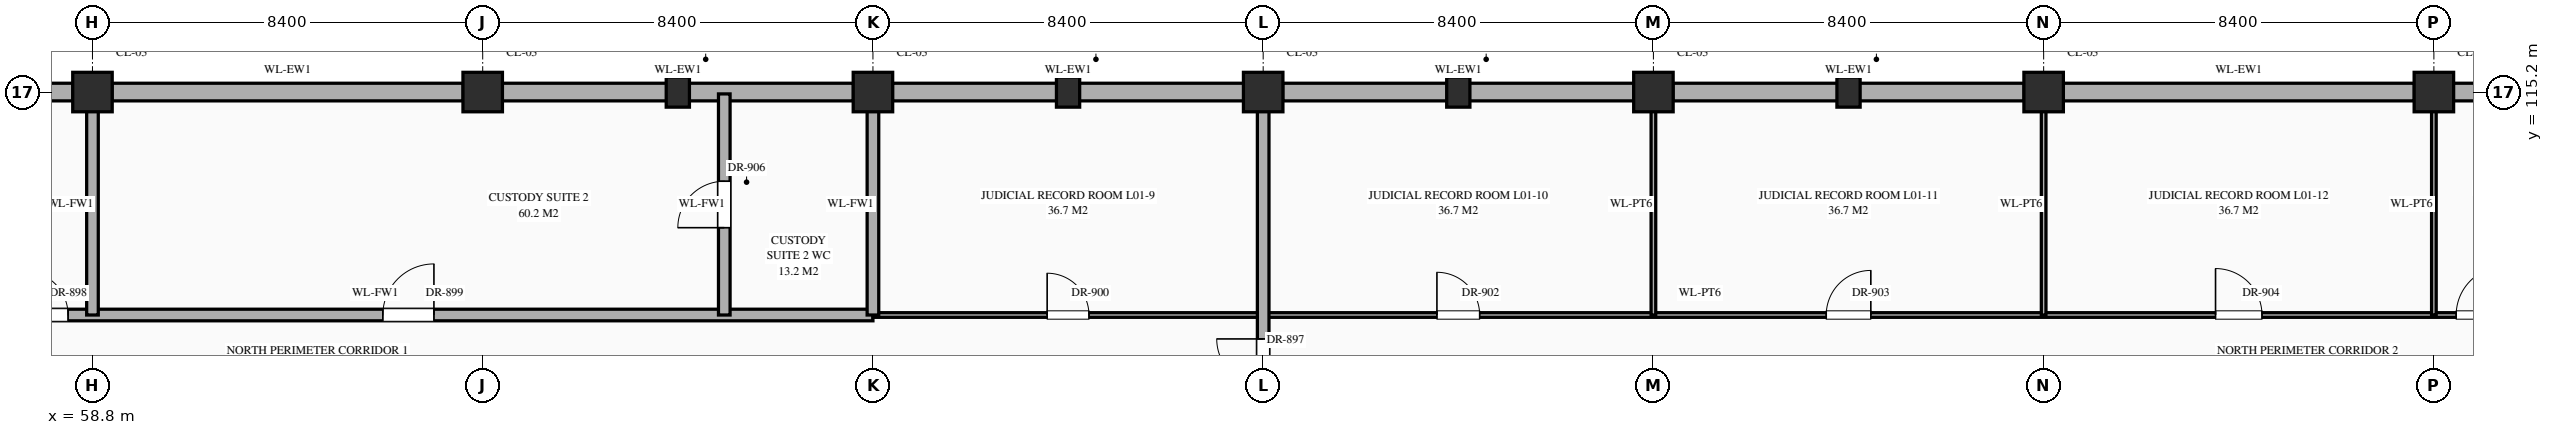
"""IFC4 building model, lengths in metres.
Left out: names, types, materials, properties, quantities, classifications, styles, units other than length and angle.
Written with IfcOpenShell. Run it as: python <this file> out.ifc"""

import sys

from ifc_helpers import new_model, si_unit, direction, frame, frame_2d, origin, origin_2d, place, context, subcontext, project, spatial, rectangle, extrude, element, fill, save


model = new_model("IFC4")
c1 = context("Model", 3, precision=1e-05, world=origin(), true_north=direction((0.0, 1.0)))
c2 = subcontext(c1, "Body", "Model", "MODEL_VIEW")
j1 = project(units=[si_unit("LENGTHUNIT", "METRE"), si_unit("PLANEANGLEUNIT", "RADIAN")], contexts=[c1])
p1 = place(None, origin())
s1 = spatial("IfcSite", under=j1, at=p1, CompositionType="ELEMENT")
p2 = place(p1, origin())
s2 = spatial("IfcBuilding", under=s1, at=p2, CompositionType="ELEMENT")
p3 = place(p2, origin())
s3 = spatial("IfcBuildingStorey", under=s2, at=p3, CompositionType="ELEMENT", Elevation=0.0)
for number, where, z_axis, x_axis in (
    (1, (58.8, 115.2, 0.0), (0.0, 0.0, 1.0), (1.0, 0.0, 0.0)),
    (2, (67.2, 115.2, 0.0), (0.0, 0.0, 1.0), (1.0, 0.0, 0.0)),
    (3, (75.6, 115.2, 0.0), (0.0, 0.0, 1.0), (1.0, 0.0, 0.0)),
    (4, (84.0, 115.2, 0.0), (0.0, 0.0, 1.0), (1.0, 0.0, 0.0)),
    (5, (92.4, 115.2, 0.0), (0.0, 0.0, 1.0), (1.0, 0.0, 0.0)),
    (6, (100.8, 115.2, 0.0), (0.0, 0.0, 1.0), (1.0, 0.0, 0.0)),
    (7, (109.2, 115.2, 0.0), (0.0, 0.0, 1.0), (1.0, 0.0, 0.0)),
):
    element("IfcColumn", number, at=place(p3, frame(where, z_axis=z_axis, x_axis=x_axis)), inside=s3, PredefinedType="COLUMN", context=c2, shape_type="SweptSolid", body=[
        extrude(rectangle(XDim=0.85, YDim=0.85, at=origin_2d()), origin(), (0.0, 0.0, 1.0), 5.4),
    ])
for number, where, z_axis, x_axis in (
    (8, (71.4, 115.2, 0.0), (0.0, 0.0, 1.0), (1.0, 0.0, 0.0)),
    (9, (79.8, 115.2, 0.0), (0.0, 0.0, 1.0), (1.0, 0.0, 0.0)),
    (10, (88.2, 115.2, 0.0), (0.0, 0.0, 1.0), (1.0, 0.0, 0.0)),
    (11, (96.6, 115.2, 0.0), (0.0, 0.0, 1.0), (1.0, 0.0, 0.0)),
):
    element("IfcColumn", number, at=place(p3, frame(where, z_axis=z_axis, x_axis=x_axis)), inside=s3, PredefinedType="PILASTER", context=c2, shape_type="SweptSolid", body=[
        extrude(rectangle(XDim=0.5, YDim=0.65, at=origin_2d()), origin(), (0.0, 0.0, 1.0), 5.4),
    ])
p4 = place(p3, frame((50.82, 115.2, 0.0), z_axis=(0.0, 0.0, 1.0), x_axis=(1.0, 0.0, 0.0)))
e12 = element("IfcWall", 12, at=p4, inside=s3, PredefinedType="STANDARD", context=c2, shape_type="SweptSolid", body=[
    extrude(rectangle(XDim=7.56, YDim=0.38, at=frame_2d((3.78, 0.0))), origin(), (0.0, 0.0, 1.0), 4.47),
])
p5 = place(p3, frame((59.22, 115.2, 0.0), z_axis=(0.0, 0.0, 1.0), x_axis=(1.0, 0.0, 0.0)))
e13 = element("IfcWall", 13, at=p5, inside=s3, PredefinedType="STANDARD", context=c2, shape_type="SweptSolid", body=[
    extrude(rectangle(XDim=7.56, YDim=0.38, at=frame_2d((3.78, 0.0))), origin(), (0.0, 0.0, 1.0), 4.47),
])
p6 = place(p3, frame((67.62, 115.2, 0.0), z_axis=(0.0, 0.0, 1.0), x_axis=(1.0, 0.0, 0.0)))
e14 = element("IfcWall", 14, at=p6, inside=s3, PredefinedType="STANDARD", context=c2, shape_type="SweptSolid", body=[
    extrude(rectangle(XDim=7.56, YDim=0.38, at=frame_2d((3.78, 0.0))), origin(), (0.0, 0.0, 1.0), 4.47),
])
for number, where, z_axis, x_axis in (
    (15, (76.02, 115.2, 0.0), (0.0, 0.0, 1.0), (1.0, 0.0, 0.0)),
    (16, (84.42, 115.2, 0.0), (0.0, 0.0, 1.0), (1.0, 0.0, 0.0)),
):
    element("IfcWall", number, at=place(p3, frame(where, z_axis=z_axis, x_axis=x_axis)), inside=s3, PredefinedType="STANDARD", context=c2, shape_type="SweptSolid", body=[
        extrude(rectangle(XDim=7.56, YDim=0.38, at=frame_2d((3.78, 0.0))), origin(), (0.0, 0.0, 1.0), 4.47),
    ])
p7 = place(p3, frame((92.82, 115.2, 0.0), z_axis=(0.0, 0.0, 1.0), x_axis=(1.0, 0.0, 0.0)))
e17 = element("IfcWall", 17, at=p7, inside=s3, PredefinedType="STANDARD", context=c2, shape_type="SweptSolid", body=[
    extrude(rectangle(XDim=7.56, YDim=0.38, at=frame_2d((3.78, 0.0))), origin(), (0.0, 0.0, 1.0), 4.47),
])
p8 = place(p3, frame((101.22, 115.2, 0.0), z_axis=(0.0, 0.0, 1.0), x_axis=(1.0, 0.0, 0.0)))
e18 = element("IfcWall", 18, at=p8, inside=s3, PredefinedType="STANDARD", context=c2, shape_type="SweptSolid", body=[
    extrude(rectangle(XDim=7.56, YDim=0.38, at=frame_2d((3.78, 0.0))), origin(), (0.0, 0.0, 1.0), 4.47),
])
p9 = place(p3, frame((109.62, 115.2, 0.0), z_axis=(0.0, 0.0, 1.0), x_axis=(1.0, 0.0, 0.0)))
e19 = element("IfcWall", 19, at=p9, inside=s3, PredefinedType="STANDARD", context=c2, shape_type="SweptSolid", body=[
    extrude(rectangle(XDim=7.56, YDim=0.38, at=frame_2d((3.78, 0.0))), origin(), (0.0, 0.0, 1.0), 4.47),
])
p10 = place(p3, frame((50.44, 110.4, 0.0), z_axis=(0.0, 0.0, 1.0), x_axis=(1.0, 0.0, 0.0)))
e20 = element("IfcWall", 20, at=p10, inside=s3, PredefinedType="STANDARD", context=c2, shape_type="SweptSolid", body=[
    extrude(rectangle(XDim=25.16, YDim=0.25, at=frame_2d((12.58, 0.0))), origin(), (0.0, 0.0, 1.0), 5.12),
])
p11 = place(p10, frame((6.885, 0.0, 0.0)))
e21 = element("IfcOpeningElement", 21, at=p11, cuts=e20, PredefinedType="OPENING", context=c2, shape_type="SweptSolid", body=[
    extrude(rectangle(XDim=0.95, YDim=2.15, at=frame_2d((0.475, 1.075))), frame((0.0, 0.137, 0.0), z_axis=(0.0, -1.0, 0.0), x_axis=(1.0, 0.0, 0.0)), (0.0, 0.0, 1.0), 0.274),
])
p12 = place(p10, frame((14.61, 0.0, 0.0)))
e22 = element("IfcOpeningElement", 22, at=p12, cuts=e20, PredefinedType="OPENING", context=c2, shape_type="SweptSolid", body=[
    extrude(rectangle(XDim=1.1, YDim=2.2, at=frame_2d((0.55, 1.1))), frame((0.0, 0.137, 0.0), z_axis=(0.0, -1.0, 0.0), x_axis=(1.0, 0.0, 0.0)), (0.0, 0.0, 1.0), 0.274),
])
p13 = place(p3, frame((75.6, 110.4, 0.0), z_axis=(0.0, 0.0, 1.0), x_axis=(1.0, 0.0, 0.0)))
e23 = element("IfcWall", 23, at=p13, inside=s3, PredefinedType="STANDARD", context=c2, shape_type="SweptSolid", body=[
    extrude(rectangle(XDim=35.6, YDim=0.1, at=frame_2d((17.8, 0.0))), origin(), (0.0, 0.0, 1.0), 5.12),
])
p14 = place(p13, frame((3.75, 0.0, 0.0)))
e24 = element("IfcOpeningElement", 24, at=p14, cuts=e23, PredefinedType="OPENING", context=c2, shape_type="SweptSolid", body=[
    extrude(rectangle(XDim=0.9, YDim=2.15, at=frame_2d((0.45, 1.075))), frame((0.0, 0.062, 0.0), z_axis=(0.0, -1.0, 0.0), x_axis=(1.0, 0.0, 0.0)), (0.0, 0.0, 1.0), 0.124),
])
p15 = place(p13, frame((12.14, 0.0, 0.0)))
e25 = element("IfcOpeningElement", 25, at=p15, cuts=e23, PredefinedType="OPENING", context=c2, shape_type="SweptSolid", body=[
    extrude(rectangle(XDim=0.92, YDim=2.15, at=frame_2d((0.46, 1.075))), frame((0.0, 0.062, 0.0), z_axis=(0.0, -1.0, 0.0), x_axis=(1.0, 0.0, 0.0)), (0.0, 0.0, 1.0), 0.124),
])
p16 = place(p13, frame((20.52, 0.0, 0.0)))
e26 = element("IfcOpeningElement", 26, at=p16, cuts=e23, PredefinedType="OPENING", context=c2, shape_type="SweptSolid", body=[
    extrude(rectangle(XDim=0.96, YDim=2.2, at=frame_2d((0.48, 1.1))), frame((0.0, 0.062, 0.0), z_axis=(0.0, -1.0, 0.0), x_axis=(1.0, 0.0, 0.0)), (0.0, 0.0, 1.0), 0.124),
])
p17 = place(p13, frame((28.9, 0.0, 0.0)))
e27 = element("IfcOpeningElement", 27, at=p17, cuts=e23, PredefinedType="OPENING", context=c2, shape_type="SweptSolid", body=[
    extrude(rectangle(XDim=1.0, YDim=2.25, at=frame_2d((0.5, 1.125))), frame((0.0, 0.062, 0.0), z_axis=(0.0, -1.0, 0.0), x_axis=(1.0, 0.0, 0.0)), (0.0, 0.0, 1.0), 0.124),
])
p18 = place(p13, frame((34.08, 0.0, 0.0)))
e28 = element("IfcOpeningElement", 28, at=p18, cuts=e23, PredefinedType="OPENING", context=c2, shape_type="SweptSolid", body=[
    extrude(rectangle(XDim=1.04, YDim=2.2, at=frame_2d((0.52, 1.1))), frame((0.0, 0.062, 0.0), z_axis=(0.0, -1.0, 0.0), x_axis=(1.0, 0.0, 0.0)), (0.0, 0.0, 1.0), 0.124),
])
p19 = place(p3, frame((58.8, 110.4, 0.0), z_axis=(0.0, 0.0, 1.0), x_axis=(0.0, 1.0, 0.0)))
e29 = element("IfcWall", 29, at=p19, inside=s3, PredefinedType="STANDARD", context=c2, shape_type="SweptSolid", body=[
    extrude(rectangle(XDim=4.76, YDim=0.25, at=frame_2d((2.38, 0.0))), origin(), (0.0, 0.0, 1.0), 4.37),
])
p20 = place(p3, frame((72.4, 110.4, 0.0), z_axis=(0.0, 0.0, 1.0), x_axis=(0.0, 1.0, 0.0)))
e30 = element("IfcWall", 30, at=p20, inside=s3, PredefinedType="STANDARD", context=c2, shape_type="SweptSolid", body=[
    extrude(rectangle(XDim=4.76, YDim=0.25, at=frame_2d((2.38, 0.0))), origin(), (0.0, 0.0, 1.0), 5.12),
])
p21 = place(p20, frame((1.88, 0.0, 0.0)))
e31 = element("IfcOpeningElement", 31, at=p21, cuts=e30, PredefinedType="OPENING", context=c2, shape_type="SweptSolid", body=[
    extrude(rectangle(XDim=1.0, YDim=2.2, at=frame_2d((0.5, 1.1))), frame((0.0, 0.137, 0.0), z_axis=(0.0, -1.0, 0.0), x_axis=(1.0, 0.0, 0.0)), (0.0, 0.0, 1.0), 0.274),
])
p22 = place(p3, frame((75.6, 110.4, 0.0), z_axis=(0.0, 0.0, 1.0), x_axis=(0.0, 1.0, 0.0)))
e32 = element("IfcWall", 32, at=p22, inside=s3, PredefinedType="STANDARD", context=c2, shape_type="SweptSolid", body=[
    extrude(rectangle(XDim=4.76, YDim=0.25, at=frame_2d((2.38, 0.0))), origin(), (0.0, 0.0, 1.0), 4.37),
])
p23 = place(p3, frame((84.0, 100.8, 0.0), z_axis=(0.0, 0.0, 1.0), x_axis=(0.0, 1.0, 0.0)))
e33 = element("IfcWall", 33, at=p23, inside=s3, PredefinedType="STANDARD", context=c2, shape_type="SweptSolid", body=[
    extrude(rectangle(XDim=14.36, YDim=0.25, at=frame_2d((7.18, 0.0))), origin(), (0.0, 0.0, 1.0), 4.37),
])
p24 = place(p23, frame((1.235, 0.0, 0.0)))
e34 = element("IfcOpeningElement", 34, at=p24, cuts=e33, PredefinedType="OPENING", context=c2, shape_type="SweptSolid", body=[
    extrude(rectangle(XDim=1.5, YDim=2.25, at=frame_2d((0.75, 1.125))), frame((0.0, 0.137, 0.0), z_axis=(0.0, -1.0, 0.0), x_axis=(1.0, 0.0, 0.0)), (0.0, 0.0, 1.0), 0.274),
])
p25 = place(p23, frame((4.465, 0.0, 0.0)))
e35 = element("IfcOpeningElement", 35, at=p25, cuts=e33, PredefinedType="OPENING", context=c2, shape_type="SweptSolid", body=[
    extrude(rectangle(XDim=1.5, YDim=2.25, at=frame_2d((0.75, 1.125))), frame((0.0, 0.137, 0.0), z_axis=(0.0, -1.0, 0.0), x_axis=(1.0, 0.0, 0.0)), (0.0, 0.0, 1.0), 0.274),
])
p26 = place(p23, frame((8.085, 0.0, 0.0)))
e36 = element("IfcOpeningElement", 36, at=p26, cuts=e33, PredefinedType="OPENING", context=c2, shape_type="SweptSolid", body=[
    extrude(rectangle(XDim=1.0, YDim=2.2, at=frame_2d((0.5, 1.1))), frame((0.0, 0.137, 0.0), z_axis=(0.0, -1.0, 0.0), x_axis=(1.0, 0.0, 0.0)), (0.0, 0.0, 1.0), 0.274),
])
for number, where, z_axis, x_axis in (
    (37, (92.4, 110.4, 0.0), (0.0, 0.0, 1.0), (0.0, 1.0, 0.0)),
    (38, (100.8, 110.4, 0.0), (0.0, 0.0, 1.0), (0.0, 1.0, 0.0)),
    (39, (109.2, 110.4, 0.0), (0.0, 0.0, 1.0), (0.0, 1.0, 0.0)),
):
    element("IfcWall", number, at=place(p3, frame(where, z_axis=z_axis, x_axis=x_axis)), inside=s3, PredefinedType="STANDARD", context=c2, shape_type="SweptSolid", body=[
        extrude(rectangle(XDim=4.76, YDim=0.1, at=frame_2d((2.38, 0.0))), origin(), (0.0, 0.0, 1.0), 4.37),
    ])
p27 = place(p26, origin())
e40 = element("IfcDoor", 40, at=p27, inside=s3, OperationType="SINGLE_SWING_RIGHT", PredefinedType="DOOR", context=c2, shape_type="SweptSolid", body=[
    extrude(rectangle(XDim=1.0, YDim=2.2, at=frame_2d((0.5, 1.1))), frame((0.0, 0.025, 0.0), z_axis=(0.0, -1.0, 0.0), x_axis=(1.0, 0.0, 0.0)), (0.0, 0.0, 1.0), 0.05),
])
fill(e36, e40)
p28 = place(p11, origin())
e41 = element("IfcDoor", 41, at=p28, inside=s3, OperationType="SINGLE_SWING_LEFT", PredefinedType="DOOR", context=c2, shape_type="SweptSolid", body=[
    extrude(rectangle(XDim=0.95, YDim=2.15, at=frame_2d((0.475, 1.075))), frame((0.0, 0.025, 0.0), z_axis=(0.0, -1.0, 0.0), x_axis=(1.0, 0.0, 0.0)), (0.0, 0.0, 1.0), 0.05),
])
fill(e21, e41)
p29 = place(p12, origin())
e42 = element("IfcDoor", 42, at=p29, inside=s3, OperationType="SINGLE_SWING_RIGHT", PredefinedType="DOOR", context=c2, shape_type="SweptSolid", body=[
    extrude(rectangle(XDim=1.1, YDim=2.2, at=frame_2d((0.55, 1.1))), frame((0.0, 0.025, 0.0), z_axis=(0.0, -1.0, 0.0), x_axis=(1.0, 0.0, 0.0)), (0.0, 0.0, 1.0), 0.05),
])
fill(e22, e42)
p30 = place(p14, origin())
e43 = element("IfcDoor", 43, at=p30, inside=s3, OperationType="SINGLE_SWING_LEFT", PredefinedType="DOOR", context=c2, shape_type="SweptSolid", body=[
    extrude(rectangle(XDim=0.9, YDim=2.15, at=frame_2d((0.45, 1.075))), frame((0.0, 0.025, 0.0), z_axis=(0.0, -1.0, 0.0), x_axis=(1.0, 0.0, 0.0)), (0.0, 0.0, 1.0), 0.05),
])
fill(e24, e43)
p31 = place(p15, origin())
e44 = element("IfcDoor", 44, at=p31, inside=s3, OperationType="SINGLE_SWING_LEFT", PredefinedType="DOOR", context=c2, shape_type="SweptSolid", body=[
    extrude(rectangle(XDim=0.92, YDim=2.15, at=frame_2d((0.46, 1.075))), frame((0.0, 0.025, 0.0), z_axis=(0.0, -1.0, 0.0), x_axis=(1.0, 0.0, 0.0)), (0.0, 0.0, 1.0), 0.05),
])
fill(e25, e44)
p32 = place(p16, origin())
e45 = element("IfcDoor", 45, at=p32, inside=s3, OperationType="SINGLE_SWING_RIGHT", PredefinedType="DOOR", context=c2, shape_type="SweptSolid", body=[
    extrude(rectangle(XDim=0.96, YDim=2.2, at=frame_2d((0.48, 1.1))), frame((0.0, 0.025, 0.0), z_axis=(0.0, -1.0, 0.0), x_axis=(1.0, 0.0, 0.0)), (0.0, 0.0, 1.0), 0.05),
])
fill(e26, e45)
p33 = place(p17, origin())
e46 = element("IfcDoor", 46, at=p33, inside=s3, OperationType="SINGLE_SWING_LEFT", PredefinedType="DOOR", context=c2, shape_type="SweptSolid", body=[
    extrude(rectangle(XDim=1.0, YDim=2.25, at=frame_2d((0.5, 1.125))), frame((0.0, 0.025, 0.0), z_axis=(0.0, -1.0, 0.0), x_axis=(1.0, 0.0, 0.0)), (0.0, 0.0, 1.0), 0.05),
])
fill(e27, e46)
p34 = place(p18, origin())
e47 = element("IfcDoor", 47, at=p34, inside=s3, OperationType="SINGLE_SWING_RIGHT", PredefinedType="DOOR", context=c2, shape_type="SweptSolid", body=[
    extrude(rectangle(XDim=1.04, YDim=2.2, at=frame_2d((0.52, 1.1))), frame((0.0, 0.025, 0.0), z_axis=(0.0, -1.0, 0.0), x_axis=(1.0, 0.0, 0.0)), (0.0, 0.0, 1.0), 0.05),
])
fill(e28, e47)
p35 = place(p21, origin())
e48 = element("IfcDoor", 48, at=p35, inside=s3, OperationType="SINGLE_SWING_LEFT", PredefinedType="DOOR", context=c2, shape_type="SweptSolid", body=[
    extrude(rectangle(XDim=1.0, YDim=2.2, at=frame_2d((0.5, 1.1))), frame((0.0, 0.025, 0.0), z_axis=(0.0, -1.0, 0.0), x_axis=(1.0, 0.0, 0.0)), (0.0, 0.0, 1.0), 0.05),
])
fill(e31, e48)
save(model, sys.argv[1])
